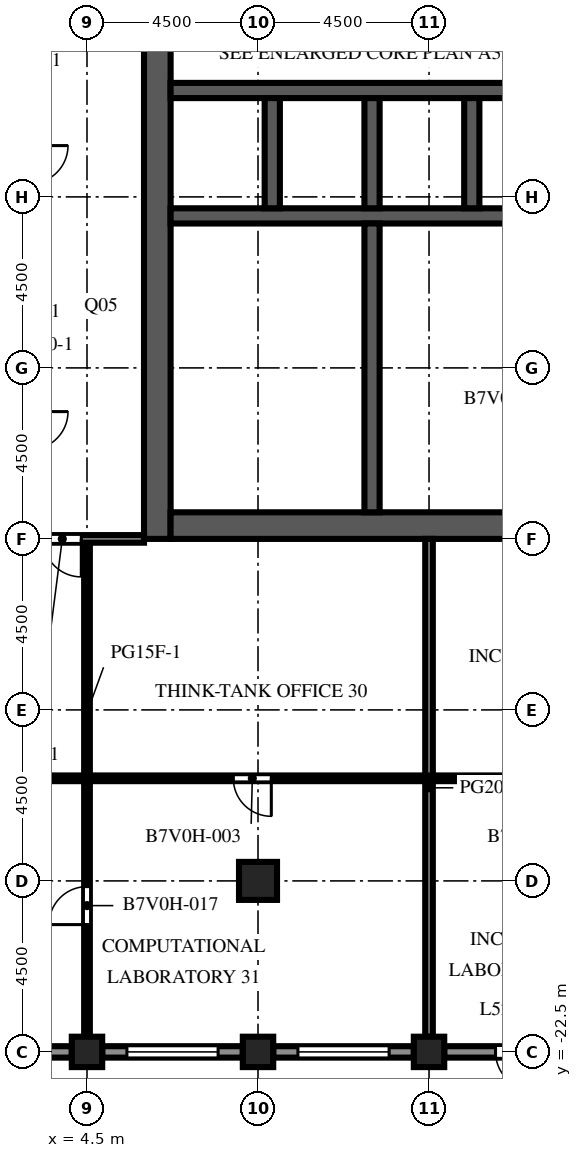
"""IFC4 building model, lengths in metres.
Left out: names, types, materials, properties, quantities, classifications, styles, units other than length and angle.
Written with IfcOpenShell. Run it as: python <this file> out.ifc"""

import sys

from ifc_helpers import new_model, si_unit, direction, frame, frame_2d, origin, origin_2d, place, context, subcontext, project, spatial, rectangle, extrude, element, fill, save


model = new_model("IFC4")
c1 = context("Model", 3, precision=1e-05, world=origin(), true_north=direction((0.0, 1.0)))
c2 = subcontext(c1, "Body", "Model", "MODEL_VIEW")
j1 = project(units=[si_unit("LENGTHUNIT", "METRE"), si_unit("PLANEANGLEUNIT", "RADIAN")], contexts=[c1])
p1 = place(None, origin())
s1 = spatial("IfcSite", under=j1, at=p1, CompositionType="ELEMENT")
p2 = place(p1, origin())
s2 = spatial("IfcBuilding", under=s1, at=p2, CompositionType="ELEMENT")
p3 = place(p2, frame((0.0, 0.0, 231.6)))
s3 = spatial("IfcBuildingStorey", under=s2, at=p3, CompositionType="ELEMENT", Elevation=231.6)
for number, where, z_axis, x_axis in (
    (1, (4.5, -22.5, 0.0), (0.0, 0.0, 1.0), (1.0, 0.0, 0.0)),
    (2, (9.0, -22.5, 0.0), (0.0, 0.0, 1.0), (1.0, 0.0, 0.0)),
    (3, (13.5, -22.5, 0.0), (0.0, 0.0, 1.0), (1.0, 0.0, 0.0)),
):
    element("IfcColumn", number, at=place(p3, frame(where, z_axis=z_axis, x_axis=x_axis)), inside=s3, PredefinedType="COLUMN", context=c2, shape_type="SweptSolid", body=[
        extrude(rectangle(XDim=0.8, YDim=0.8, at=origin_2d()), origin(), (0.0, 0.0, 1.0), 4.1),
    ])
p4 = place(p3, frame((9.0, -18.0, 0.0), z_axis=(0.0, 0.0, 1.0), x_axis=(1.0, 0.0, 0.0)))
e4 = element("IfcColumn", 4, at=p4, inside=s3, PredefinedType="COLUMN", context=c2, shape_type="SweptSolid", body=[
    extrude(rectangle(XDim=1.0, YDim=1.0, at=origin_2d()), origin(), (0.0, 0.0, 1.0), 4.1),
])
p5 = place(p3, frame((6.35, -9.0, 0.0), z_axis=(0.0, 0.0, 1.0), x_axis=(0.0, 1.0, 0.0)))
e5 = element("IfcWall", 5, at=p5, inside=s3, PredefinedType="SHEAR", context=c2, shape_type="SweptSolid", body=[
    extrude(rectangle(XDim=27.5, YDim=0.7, at=frame_2d((13.75, 0.0))), origin(), (0.0, 0.0, 1.0), 4.1),
])
p6 = place(p5, frame((12.55, 0.0, 0.0)))
e6 = element("IfcOpeningElement", 6, at=p6, cuts=e5, PredefinedType="OPENING", context=c2, shape_type="SweptSolid", body=[
    extrude(rectangle(XDim=2.4, YDim=2.4, at=frame_2d((1.2, 1.2))), frame((0.0, 0.36, 0.0), z_axis=(0.0, -1.0, 0.0), x_axis=(1.0, 0.0, 0.0)), (0.0, 0.0, 1.0), 0.72),
])
p7 = place(p5, frame((5.42, 0.0, 0.0)))
e7 = element("IfcOpeningElement", 7, at=p7, cuts=e5, PredefinedType="OPENING", context=c2, shape_type="SweptSolid", body=[
    extrude(rectangle(XDim=1.2, YDim=2.1, at=frame_2d((0.6, 1.05))), frame((0.0, 0.36, 0.0), z_axis=(0.0, -1.0, 0.0), x_axis=(1.0, 0.0, 0.0)), (0.0, 0.0, 1.0), 0.72),
])
p8 = place(p5, frame((19.46, 0.0, 0.0)))
e8 = element("IfcOpeningElement", 8, at=p8, cuts=e5, PredefinedType="OPENING", context=c2, shape_type="SweptSolid", body=[
    extrude(rectangle(XDim=1.0, YDim=2.1, at=frame_2d((0.5, 1.05))), frame((0.0, 0.36, 0.0), z_axis=(0.0, -1.0, 0.0), x_axis=(1.0, 0.0, 0.0)), (0.0, 0.0, 1.0), 0.72),
])
p9 = place(p5, frame((21.17, 0.0, 0.0)))
e9 = element("IfcOpeningElement", 9, at=p9, cuts=e5, PredefinedType="OPENING", context=c2, shape_type="SweptSolid", body=[
    extrude(rectangle(XDim=1.0, YDim=2.1, at=frame_2d((0.5, 1.05))), frame((0.0, 0.36, 0.0), z_axis=(0.0, -1.0, 0.0), x_axis=(1.0, 0.0, 0.0)), (0.0, 0.0, 1.0), 0.72),
])
p10 = place(p5, frame((23.26, 0.0, 0.0)))
e10 = element("IfcOpeningElement", 10, at=p10, cuts=e5, PredefinedType="OPENING", context=c2, shape_type="SweptSolid", body=[
    extrude(rectangle(XDim=1.0, YDim=2.1, at=frame_2d((0.5, 1.05))), frame((0.0, 0.36, 0.0), z_axis=(0.0, -1.0, 0.0), x_axis=(1.0, 0.0, 0.0)), (0.0, 0.0, 1.0), 0.72),
])
p11 = place(p5, frame((25.35, 0.0, 0.0)))
e11 = element("IfcOpeningElement", 11, at=p11, cuts=e5, PredefinedType="OPENING", context=c2, shape_type="SweptSolid", body=[
    extrude(rectangle(XDim=1.0, YDim=2.1, at=frame_2d((0.5, 1.05))), frame((0.0, 0.36, 0.0), z_axis=(0.0, -1.0, 0.0), x_axis=(1.0, 0.0, 0.0)), (0.0, 0.0, 1.0), 0.72),
])
p12 = place(p3, frame((6.7, -8.65, 0.0), z_axis=(0.0, 0.0, 1.0), x_axis=(1.0, 0.0, 0.0)))
e12 = element("IfcWall", 12, at=p12, inside=s3, PredefinedType="SHEAR", context=c2, shape_type="SweptSolid", body=[
    extrude(rectangle(XDim=10.6, YDim=0.7, at=frame_2d((5.3, 0.0))), origin(), (0.0, 0.0, 1.0), 4.1),
])
p13 = place(p3, frame((6.7, -0.5, 0.0), z_axis=(0.0, 0.0, 1.0), x_axis=(1.0, 0.0, 0.0)))
e13 = element("IfcWall", 13, at=p13, inside=s3, PredefinedType="SHEAR", context=c2, shape_type="SweptSolid", body=[
    extrude(rectangle(XDim=10.6, YDim=0.4, at=frame_2d((5.3, 0.0))), origin(), (0.0, 0.0, 1.0), 4.1),
])
p14 = place(p3, frame((6.7, 2.8, 0.0), z_axis=(0.0, 0.0, 1.0), x_axis=(1.0, 0.0, 0.0)))
e14 = element("IfcWall", 14, at=p14, inside=s3, PredefinedType="SHEAR", context=c2, shape_type="SweptSolid", body=[
    extrude(rectangle(XDim=10.6, YDim=0.4, at=frame_2d((5.3, 0.0))), origin(), (0.0, 0.0, 1.0), 4.1),
])
p15 = place(p14, frame((0.688, 0.0, 0.0)))
e15 = element("IfcOpeningElement", 15, at=p15, cuts=e14, PredefinedType="OPENING", context=c2, shape_type="SweptSolid", body=[
    extrude(rectangle(XDim=1.1, YDim=2.1, at=frame_2d((0.55, 1.05))), frame((0.0, 0.21, 0.0), z_axis=(0.0, -1.0, 0.0), x_axis=(1.0, 0.0, 0.0)), (0.0, 0.0, 1.0), 0.42),
])
p16 = place(p14, frame((3.438, 0.0, 0.0)))
e16 = element("IfcOpeningElement", 16, at=p16, cuts=e14, PredefinedType="OPENING", context=c2, shape_type="SweptSolid", body=[
    extrude(rectangle(XDim=1.1, YDim=2.1, at=frame_2d((0.55, 1.05))), frame((0.0, 0.21, 0.0), z_axis=(0.0, -1.0, 0.0), x_axis=(1.0, 0.0, 0.0)), (0.0, 0.0, 1.0), 0.42),
])
p17 = place(p14, frame((6.113, 0.0, 0.0)))
e17 = element("IfcOpeningElement", 17, at=p17, cuts=e14, PredefinedType="OPENING", context=c2, shape_type="SweptSolid", body=[
    extrude(rectangle(XDim=1.0, YDim=2.1, at=frame_2d((0.5, 1.05))), frame((0.0, 0.21, 0.0), z_axis=(0.0, -1.0, 0.0), x_axis=(1.0, 0.0, 0.0)), (0.0, 0.0, 1.0), 0.42),
])
p18 = place(p14, frame((8.863, 0.0, 0.0)))
e18 = element("IfcOpeningElement", 18, at=p18, cuts=e14, PredefinedType="OPENING", context=c2, shape_type="SweptSolid", body=[
    extrude(rectangle(XDim=1.0, YDim=2.1, at=frame_2d((0.5, 1.05))), frame((0.0, 0.21, 0.0), z_axis=(0.0, -1.0, 0.0), x_axis=(1.0, 0.0, 0.0)), (0.0, 0.0, 1.0), 0.42),
])
for number, where, z_axis, x_axis in (
    (19, (9.375, -0.3, 0.0), (0.0, 0.0, 1.0), (0.0, 1.0, 0.0)),
    (20, (12.0, -0.3, 0.0), (0.0, 0.0, 1.0), (0.0, 1.0, 0.0)),
    (21, (14.625, -0.3, 0.0), (0.0, 0.0, 1.0), (0.0, 1.0, 0.0)),
):
    element("IfcWall", number, at=place(p3, frame(where, z_axis=z_axis, x_axis=x_axis)), inside=s3, PredefinedType="SHEAR", context=c2, shape_type="SweptSolid", body=[
        extrude(rectangle(XDim=2.9, YDim=0.4, at=frame_2d((1.45, 0.0))), origin(), (0.0, 0.0, 1.0), 4.1),
    ])
p19 = place(p3, frame((12.0, -8.3, 0.0), z_axis=(0.0, 0.0, 1.0), x_axis=(0.0, 1.0, 0.0)))
e22 = element("IfcWall", 22, at=p19, inside=s3, PredefinedType="SHEAR", context=c2, shape_type="SweptSolid", body=[
    extrude(rectangle(XDim=7.6, YDim=0.4, at=frame_2d((3.8, 0.0))), origin(), (0.0, 0.0, 1.0), 4.1),
])
p20 = place(p3, frame((4.1, -22.5, 0.0), z_axis=(0.0, 0.0, 1.0), x_axis=(-1.0, 0.0, 0.0)))
e23 = element("IfcWall", 23, at=p20, inside=s3, PredefinedType="SOLIDWALL", context=c2, shape_type="SweptSolid", body=[
    extrude(rectangle(XDim=3.7, YDim=0.3, at=frame_2d((1.85, 0.0))), origin(), (0.0, 0.0, 1.0), 2.85),
])
p21 = place(p20, frame((0.65, 0.0, 0.8)))
e24 = element("IfcOpeningElement", 24, at=p21, cuts=e23, PredefinedType="OPENING", context=c2, shape_type="SweptSolid", body=[
    extrude(rectangle(XDim=2.4, YDim=1.7, at=frame_2d((1.2, 0.85))), frame((0.0, 0.16, 0.0), z_axis=(0.0, -1.0, 0.0), x_axis=(1.0, 0.0, 0.0)), (0.0, 0.0, 1.0), 0.32),
])
p22 = place(p3, frame((8.6, -22.5, 0.0), z_axis=(0.0, 0.0, 1.0), x_axis=(-1.0, 0.0, 0.0)))
e25 = element("IfcWall", 25, at=p22, inside=s3, PredefinedType="SOLIDWALL", context=c2, shape_type="SweptSolid", body=[
    extrude(rectangle(XDim=3.7, YDim=0.3, at=frame_2d((1.85, 0.0))), origin(), (0.0, 0.0, 1.0), 2.85),
])
p23 = place(p22, frame((0.65, 0.0, 0.8)))
e26 = element("IfcOpeningElement", 26, at=p23, cuts=e25, PredefinedType="OPENING", context=c2, shape_type="SweptSolid", body=[
    extrude(rectangle(XDim=2.4, YDim=1.7, at=frame_2d((1.2, 0.85))), frame((0.0, 0.16, 0.0), z_axis=(0.0, -1.0, 0.0), x_axis=(1.0, 0.0, 0.0)), (0.0, 0.0, 1.0), 0.32),
])
p24 = place(p3, frame((13.1, -22.5, 0.0), z_axis=(0.0, 0.0, 1.0), x_axis=(-1.0, 0.0, 0.0)))
e27 = element("IfcWall", 27, at=p24, inside=s3, PredefinedType="SOLIDWALL", context=c2, shape_type="SweptSolid", body=[
    extrude(rectangle(XDim=3.7, YDim=0.3, at=frame_2d((1.85, 0.0))), origin(), (0.0, 0.0, 1.0), 2.85),
])
p25 = place(p24, frame((0.65, 0.0, 0.8)))
e28 = element("IfcOpeningElement", 28, at=p25, cuts=e27, PredefinedType="OPENING", context=c2, shape_type="SweptSolid", body=[
    extrude(rectangle(XDim=2.4, YDim=1.7, at=frame_2d((1.2, 0.85))), frame((0.0, 0.16, 0.0), z_axis=(0.0, -1.0, 0.0), x_axis=(1.0, 0.0, 0.0)), (0.0, 0.0, 1.0), 0.32),
])
p26 = place(p3, frame((17.6, -22.5, 0.0), z_axis=(0.0, 0.0, 1.0), x_axis=(-1.0, 0.0, 0.0)))
e29 = element("IfcWall", 29, at=p26, inside=s3, PredefinedType="SOLIDWALL", context=c2, shape_type="SweptSolid", body=[
    extrude(rectangle(XDim=3.7, YDim=0.3, at=frame_2d((1.85, 0.0))), origin(), (0.0, 0.0, 1.0), 2.85),
])
p27 = place(p26, frame((1.35, 0.0, 0.0)))
e30 = element("IfcOpeningElement", 30, at=p27, cuts=e29, PredefinedType="OPENING", context=c2, shape_type="SweptSolid", body=[
    extrude(rectangle(XDim=1.0, YDim=2.2, at=frame_2d((0.5, 1.1))), frame((0.0, 0.16, 0.0), z_axis=(0.0, -1.0, 0.0), x_axis=(1.0, 0.0, 0.0)), (0.0, 0.0, 1.0), 0.32),
])
p28 = place(p3, frame((6.7, -5.26, 0.0), z_axis=(0.0, 0.0, 1.0), x_axis=(1.0, 0.0, 0.0)))
e31 = element("IfcWall", 31, at=p28, inside=s3, PredefinedType="PARTITIONING", context=c2, shape_type="SweptSolid", body=[
    extrude(rectangle(XDim=1.5, YDim=0.1, at=frame_2d((0.75, 0.0))), origin(), (0.0, 0.0, 1.0), 3.65),
])
p29 = place(p28, frame((0.25, 0.0, 0.0)))
e32 = element("IfcOpeningElement", 32, at=p29, cuts=e31, PredefinedType="OPENING", context=c2, shape_type="SweptSolid", body=[
    extrude(rectangle(XDim=1.0, YDim=2.1, at=frame_2d((0.5, 1.05))), frame((0.0, 0.06, 0.0), z_axis=(0.0, -1.0, 0.0), x_axis=(1.0, 0.0, 0.0)), (0.0, 0.0, 1.0), 0.12),
])
p30 = place(p3, frame((8.2, -5.26, 0.0), z_axis=(0.0, 0.0, 1.0), x_axis=(0.0, 1.0, 0.0)))
e33 = element("IfcWall", 33, at=p30, inside=s3, PredefinedType="PARTITIONING", context=c2, shape_type="SweptSolid", body=[
    extrude(rectangle(XDim=2.28, YDim=0.1, at=frame_2d((1.14, 0.0))), origin(), (0.0, 0.0, 1.0), 3.65),
])
p31 = place(p30, frame((0.64, 0.0, 0.0)))
e34 = element("IfcOpeningElement", 34, at=p31, cuts=e33, PredefinedType="OPENING", context=c2, shape_type="SweptSolid", body=[
    extrude(rectangle(XDim=1.0, YDim=2.1, at=frame_2d((0.5, 1.05))), frame((0.0, 0.06, 0.0), z_axis=(0.0, -1.0, 0.0), x_axis=(1.0, 0.0, 0.0)), (0.0, 0.0, 1.0), 0.12),
])
p32 = place(p3, frame((8.2, -2.98, 0.0), z_axis=(0.0, 0.0, 1.0), x_axis=(0.0, 1.0, 0.0)))
e35 = element("IfcWall", 35, at=p32, inside=s3, PredefinedType="PARTITIONING", context=c2, shape_type="SweptSolid", body=[
    extrude(rectangle(XDim=2.28, YDim=0.1, at=frame_2d((1.14, 0.0))), origin(), (0.0, 0.0, 1.0), 3.65),
])
p33 = place(p32, frame((0.64, 0.0, 0.0)))
e36 = element("IfcOpeningElement", 36, at=p33, cuts=e35, PredefinedType="OPENING", context=c2, shape_type="SweptSolid", body=[
    extrude(rectangle(XDim=1.0, YDim=2.1, at=frame_2d((0.5, 1.05))), frame((0.0, 0.06, 0.0), z_axis=(0.0, -1.0, 0.0), x_axis=(1.0, 0.0, 0.0)), (0.0, 0.0, 1.0), 0.12),
])
for number, where, z_axis, x_axis in (
    (37, (8.2, -5.26, 0.0), (0.0, 0.0, 1.0), (1.0, 0.0, 0.0)),
    (38, (8.2, -2.98, 0.0), (0.0, 0.0, 1.0), (1.0, 0.0, 0.0)),
):
    element("IfcWall", number, at=place(p3, frame(where, z_axis=z_axis, x_axis=x_axis)), inside=s3, PredefinedType="PARTITIONING", context=c2, shape_type="SweptSolid", body=[
        extrude(rectangle(XDim=3.6, YDim=0.1, at=frame_2d((1.8, 0.0))), origin(), (0.0, 0.0, 1.0), 3.65),
    ])
p34 = place(p3, frame((4.5, -9.0, 0.0), z_axis=(0.0, 0.0, 1.0), x_axis=(0.0, -1.0, 0.0)))
e39 = element("IfcWall", 39, at=p34, inside=s3, PredefinedType="PARTITIONING", context=c2, shape_type="SweptSolid", body=[
    extrude(rectangle(XDim=13.1, YDim=0.15, at=frame_2d((6.55, 0.0))), origin(), (0.0, 0.0, 1.0), 3.65),
])
p35 = place(p34, frame((9.15, 0.0, 0.0)))
e40 = element("IfcOpeningElement", 40, at=p35, cuts=e39, PredefinedType="OPENING", context=c2, shape_type="SweptSolid", body=[
    extrude(rectangle(XDim=1.0, YDim=2.1, at=frame_2d((0.5, 1.05))), frame((0.0, 0.085, 0.0), z_axis=(0.0, -1.0, 0.0), x_axis=(1.0, 0.0, 0.0)), (0.0, 0.0, 1.0), 0.17),
])
p36 = place(p3, frame((13.5, -22.1, 0.0), z_axis=(0.0, 0.0, 1.0), x_axis=(0.0, 1.0, 0.0)))
e41 = element("IfcWall", 41, at=p36, inside=s3, PredefinedType="PARTITIONING", context=c2, shape_type="SweptSolid", body=[
    extrude(rectangle(XDim=13.1, YDim=0.2, at=frame_2d((6.55, 0.0))), origin(), (0.0, 0.0, 1.0), 3.65),
])
p37 = place(p3, frame((21.0, -15.3, 0.0), z_axis=(0.0, 0.0, 1.0), x_axis=(-1.0, 0.0, 0.0)))
e42 = element("IfcWall", 42, at=p37, inside=s3, PredefinedType="PARTITIONING", context=c2, shape_type="SweptSolid", body=[
    extrude(rectangle(XDim=34.5, YDim=0.15, at=frame_2d((17.25, 0.0))), origin(), (0.0, 0.0, 1.0), 3.65),
])
p38 = place(p37, frame((31.9, 0.0, 0.0)))
e43 = element("IfcOpeningElement", 43, at=p38, cuts=e42, PredefinedType="OPENING", context=c2, shape_type="SweptSolid", body=[
    extrude(rectangle(XDim=1.0, YDim=2.1, at=frame_2d((0.5, 1.05))), frame((0.0, 0.085, 0.0), z_axis=(0.0, -1.0, 0.0), x_axis=(1.0, 0.0, 0.0)), (0.0, 0.0, 1.0), 0.17),
])
p39 = place(p37, frame((23.4, 0.0, 0.0)))
e44 = element("IfcOpeningElement", 44, at=p39, cuts=e42, PredefinedType="OPENING", context=c2, shape_type="SweptSolid", body=[
    extrude(rectangle(XDim=1.0, YDim=2.1, at=frame_2d((0.5, 1.05))), frame((0.0, 0.085, 0.0), z_axis=(0.0, -1.0, 0.0), x_axis=(1.0, 0.0, 0.0)), (0.0, 0.0, 1.0), 0.17),
])
p40 = place(p37, frame((11.65, 0.0, 0.0)))
e45 = element("IfcOpeningElement", 45, at=p40, cuts=e42, PredefinedType="OPENING", context=c2, shape_type="SweptSolid", body=[
    extrude(rectangle(XDim=1.0, YDim=2.1, at=frame_2d((0.5, 1.05))), frame((0.0, 0.085, 0.0), z_axis=(0.0, -1.0, 0.0), x_axis=(1.0, 0.0, 0.0)), (0.0, 0.0, 1.0), 0.17),
])
p41 = place(p37, frame((2.65, 0.0, 0.0)))
e46 = element("IfcOpeningElement", 46, at=p41, cuts=e42, PredefinedType="OPENING", context=c2, shape_type="SweptSolid", body=[
    extrude(rectangle(XDim=1.0, YDim=2.1, at=frame_2d((0.5, 1.05))), frame((0.0, 0.085, 0.0), z_axis=(0.0, -1.0, 0.0), x_axis=(1.0, 0.0, 0.0)), (0.0, 0.0, 1.0), 0.17),
])
p42 = place(p3, frame((6.0, -9.0, 0.0), z_axis=(0.0, 0.0, 1.0), x_axis=(-1.0, 0.0, 0.0)))
e47 = element("IfcWall", 47, at=p42, inside=s3, PredefinedType="PARTITIONING", context=c2, shape_type="SweptSolid", body=[
    extrude(rectangle(XDim=4.5, YDim=0.2, at=frame_2d((2.25, 0.0))), origin(), (0.0, 0.0, 1.0), 3.65),
])
p43 = place(p42, frame((1.65, 0.0, 0.0)))
e48 = element("IfcOpeningElement", 48, at=p43, cuts=e47, PredefinedType="OPENING", context=c2, shape_type="SweptSolid", body=[
    extrude(rectangle(XDim=1.0, YDim=2.1, at=frame_2d((0.5, 1.05))), frame((0.0, 0.11, 0.0), z_axis=(0.0, -1.0, 0.0), x_axis=(1.0, 0.0, 0.0)), (0.0, 0.0, 1.0), 0.22),
])
p44 = place(p23, origin())
e49 = element("IfcWindow", 49, at=p44, inside=s3, PartitioningType="SINGLE_PANEL", PredefinedType="WINDOW", context=c2, shape_type="SweptSolid", body=[
    extrude(rectangle(XDim=2.4, YDim=1.7, at=frame_2d((1.2, 0.85))), frame((0.0, 0.03, 0.0), z_axis=(0.0, -1.0, 0.0), x_axis=(1.0, 0.0, 0.0)), (0.0, 0.0, 1.0), 0.06),
])
fill(e26, e49)
p45 = place(p25, origin())
e50 = element("IfcWindow", 50, at=p45, inside=s3, PartitioningType="SINGLE_PANEL", PredefinedType="WINDOW", context=c2, shape_type="SweptSolid", body=[
    extrude(rectangle(XDim=2.4, YDim=1.7, at=frame_2d((1.2, 0.85))), frame((0.0, 0.03, 0.0), z_axis=(0.0, -1.0, 0.0), x_axis=(1.0, 0.0, 0.0)), (0.0, 0.0, 1.0), 0.06),
])
fill(e28, e50)
p46 = place(p27, origin())
e51 = element("IfcDoor", 51, at=p46, inside=s3, OperationType="SINGLE_SWING_LEFT", PredefinedType="DOOR", context=c2, shape_type="SweptSolid", body=[
    extrude(rectangle(XDim=1.0, YDim=2.2, at=frame_2d((0.5, 1.1))), frame((0.0, 0.025, 0.0), z_axis=(0.0, -1.0, 0.0), x_axis=(1.0, 0.0, 0.0)), (0.0, 0.0, 1.0), 0.05),
])
fill(e30, e51)
p47 = place(p15, origin())
e52 = element("IfcDoor", 52, at=p47, inside=s3, OperationType="DOUBLE_DOOR_SLIDING", PredefinedType="DOOR", context=c2, shape_type="SweptSolid", body=[
    extrude(rectangle(XDim=1.1, YDim=2.1, at=frame_2d((0.55, 1.05))), frame((0.0, 0.025, 0.0), z_axis=(0.0, -1.0, 0.0), x_axis=(1.0, 0.0, 0.0)), (0.0, 0.0, 1.0), 0.05),
])
fill(e15, e52)
p48 = place(p16, origin())
e53 = element("IfcDoor", 53, at=p48, inside=s3, OperationType="DOUBLE_DOOR_SLIDING", PredefinedType="DOOR", context=c2, shape_type="SweptSolid", body=[
    extrude(rectangle(XDim=1.1, YDim=2.1, at=frame_2d((0.55, 1.05))), frame((0.0, 0.025, 0.0), z_axis=(0.0, -1.0, 0.0), x_axis=(1.0, 0.0, 0.0)), (0.0, 0.0, 1.0), 0.05),
])
fill(e16, e53)
p49 = place(p6, origin())
e54 = element("IfcDoor", 54, at=p49, inside=s3, OperationType="DOUBLE_DOOR_DOUBLE_SWING", PredefinedType="DOOR", context=c2, shape_type="SweptSolid", body=[
    extrude(rectangle(XDim=2.4, YDim=2.4, at=frame_2d((1.2, 1.2))), frame((0.0, 0.025, 0.0), z_axis=(0.0, -1.0, 0.0), x_axis=(1.0, 0.0, 0.0)), (0.0, 0.0, 1.0), 0.05),
])
fill(e6, e54)
p50 = place(p17, origin())
e55 = element("IfcDoor", 55, at=p50, inside=s3, OperationType="SINGLE_SWING_LEFT", PredefinedType="DOOR", context=c2, shape_type="SweptSolid", body=[
    extrude(rectangle(XDim=1.0, YDim=2.1, at=frame_2d((0.5, 1.05))), frame((0.0, 0.025, 0.0), z_axis=(0.0, -1.0, 0.0), x_axis=(1.0, 0.0, 0.0)), (0.0, 0.0, 1.0), 0.05),
])
fill(e17, e55)
p51 = place(p7, origin())
e56 = element("IfcDoor", 56, at=p51, inside=s3, OperationType="SINGLE_SWING_RIGHT", PredefinedType="DOOR", context=c2, shape_type="SweptSolid", body=[
    extrude(rectangle(XDim=1.2, YDim=2.1, at=frame_2d((0.6, 1.05))), frame((0.0, -0.275, 0.0), z_axis=(0.0, -1.0, 0.0), x_axis=(1.0, 0.0, 0.0)), (0.0, 0.0, 1.0), 0.05),
])
fill(e7, e56)
p52 = place(p29, origin())
e57 = element("IfcDoor", 57, at=p52, inside=s3, OperationType="SINGLE_SWING_LEFT", PredefinedType="DOOR", context=c2, shape_type="SweptSolid", body=[
    extrude(rectangle(XDim=1.0, YDim=2.1, at=frame_2d((0.5, 1.05))), frame((0.0, 0.025, 0.0), z_axis=(0.0, -1.0, 0.0), x_axis=(1.0, 0.0, 0.0)), (0.0, 0.0, 1.0), 0.05),
])
fill(e32, e57)
p53 = place(p31, origin())
e58 = element("IfcDoor", 58, at=p53, inside=s3, OperationType="SINGLE_SWING_RIGHT", PredefinedType="DOOR", context=c2, shape_type="SweptSolid", body=[
    extrude(rectangle(XDim=1.0, YDim=2.1, at=frame_2d((0.5, 1.05))), frame((0.0, 0.025, 0.0), z_axis=(0.0, -1.0, 0.0), x_axis=(1.0, 0.0, 0.0)), (0.0, 0.0, 1.0), 0.05),
])
fill(e34, e58)
p54 = place(p33, origin())
e59 = element("IfcDoor", 59, at=p54, inside=s3, OperationType="SINGLE_SWING_LEFT", PredefinedType="DOOR", context=c2, shape_type="SweptSolid", body=[
    extrude(rectangle(XDim=1.0, YDim=2.1, at=frame_2d((0.5, 1.05))), frame((0.0, 0.025, 0.0), z_axis=(0.0, -1.0, 0.0), x_axis=(1.0, 0.0, 0.0)), (0.0, 0.0, 1.0), 0.05),
])
fill(e36, e59)
p55 = place(p40, origin())
e60 = element("IfcDoor", 60, at=p55, inside=s3, OperationType="SINGLE_SWING_LEFT", PredefinedType="DOOR", context=c2, shape_type="SweptSolid", body=[
    extrude(rectangle(XDim=1.0, YDim=2.1, at=frame_2d((0.5, 1.05))), frame((0.0, 0.025, 0.0), z_axis=(0.0, -1.0, 0.0), x_axis=(1.0, 0.0, 0.0)), (0.0, 0.0, 1.0), 0.05),
])
fill(e45, e60)
p56 = place(p43, origin())
e61 = element("IfcDoor", 61, at=p56, inside=s3, OperationType="SINGLE_SWING_LEFT", PredefinedType="DOOR", context=c2, shape_type="SweptSolid", body=[
    extrude(rectangle(XDim=1.0, YDim=2.1, at=frame_2d((0.5, 1.05))), frame((0.0, 0.025, 0.0), z_axis=(0.0, -1.0, 0.0), x_axis=(1.0, 0.0, 0.0)), (0.0, 0.0, 1.0), 0.05),
])
fill(e48, e61)
p57 = place(p35, origin())
e62 = element("IfcDoor", 62, at=p57, inside=s3, OperationType="SINGLE_SWING_RIGHT", PredefinedType="DOOR", context=c2, shape_type="SweptSolid", body=[
    extrude(rectangle(XDim=1.0, YDim=2.1, at=frame_2d((0.5, 1.05))), frame((0.0, 0.025, 0.0), z_axis=(0.0, -1.0, 0.0), x_axis=(1.0, 0.0, 0.0)), (0.0, 0.0, 1.0), 0.05),
])
fill(e40, e62)
save(model, sys.argv[1])
